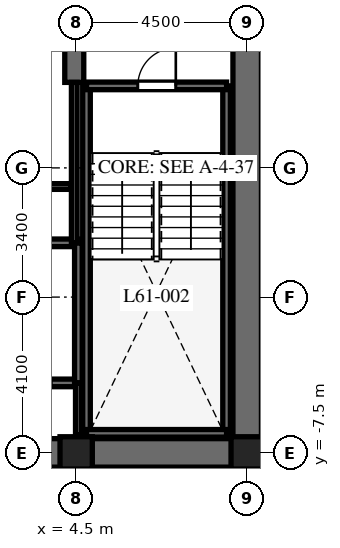
"""IFC4 building model, lengths in metres.
Left out: names, types, materials, properties, quantities, classifications, styles, units other than length and angle.
Written with IfcOpenShell. Run it as: python <this file> out.ifc"""

import sys

from ifc_helpers import new_model, si_unit, direction, frame, frame_2d, origin, origin_2d, place, context, subcontext, project, spatial, rectangle, extrude, element, fill, save


model = new_model("IFC4")
c1 = context("Model", 3, precision=1e-05, world=origin(), true_north=direction((0.0, 1.0)))
c2 = subcontext(c1, "Body", "Model", "MODEL_VIEW")
j1 = project(units=[si_unit("LENGTHUNIT", "METRE"), si_unit("PLANEANGLEUNIT", "RADIAN")], contexts=[c1])
p1 = place(None, origin())
s1 = spatial("IfcSite", under=j1, at=p1, CompositionType="ELEMENT")
p2 = place(p1, origin())
s2 = spatial("IfcBuilding", under=s1, at=p2, CompositionType="ELEMENT")
p3 = place(p2, frame((0.0, 0.0, 244.5)))
s3 = spatial("IfcBuildingStorey", under=s2, at=p3, CompositionType="ELEMENT", Elevation=244.5)
p4 = place(p3, frame((-9.375, -7.5, 0.0), z_axis=(0.0, 0.0, 1.0), x_axis=(1.0, 0.0, 0.0)))
e1 = element("IfcWall", 1, at=p4, inside=s3, PredefinedType="SHEAR", context=c2, shape_type="SweptSolid", body=[
    extrude(rectangle(XDim=18.75, YDim=0.75, at=frame_2d((9.375, 0.0))), origin(), (0.0, 0.0, 1.0), 3.8),
])
p5 = place(p4, frame((9.425, 0.0, 0.0)))
e2 = element("IfcOpeningElement", 2, at=p5, cuts=e1, PredefinedType="OPENING", context=c2, shape_type="SweptSolid", body=[
    extrude(rectangle(XDim=1.0, YDim=2.15, at=frame_2d((0.5, 1.075))), frame((0.0, 0.385, 0.0), z_axis=(0.0, -1.0, 0.0), x_axis=(1.0, 0.0, 0.0)), (0.0, 0.0, 1.0), 0.77),
])
p6 = place(p3, frame((9.0, -7.125, 0.0), z_axis=(0.0, 0.0, 1.0), x_axis=(0.0, 1.0, 0.0)))
e3 = element("IfcWall", 3, at=p6, inside=s3, PredefinedType="SHEAR", context=c2, shape_type="SweptSolid", body=[
    extrude(rectangle(XDim=14.25, YDim=0.75, at=frame_2d((7.125, 0.0))), origin(), (0.0, 0.0, 1.0), 3.8),
])
p7 = place(p6, frame((10.25, 0.0, 0.0)))
e4 = element("IfcOpeningElement", 4, at=p7, cuts=e3, PredefinedType="OPENING", context=c2, shape_type="SweptSolid", body=[
    extrude(rectangle(XDim=1.05, YDim=2.15, at=frame_2d((0.525, 1.075))), frame((0.0, 0.385, 0.0), z_axis=(0.0, -1.0, 0.0), x_axis=(1.0, 0.0, 0.0)), (0.0, 0.0, 1.0), 0.77),
])
p8 = place(p3, frame((4.45, 2.25, 0.0), z_axis=(0.0, 0.0, 1.0), x_axis=(0.0, 1.0, 0.0)))
e5 = element("IfcWall", 5, at=p8, inside=s3, PredefinedType="SHEAR", context=c2, shape_type="SweptSolid", body=[
    extrude(rectangle(XDim=4.875, YDim=0.5, at=frame_2d((2.438, 0.0))), origin(), (0.0, 0.0, 1.0), 3.8),
])
for number, where, z_axis, x_axis in (
    (6, (4.772, -6.985, 0.0), (0.0, 0.0, 1.0), (0.0, 1.0, 0.0)),
    (7, (8.458, -6.985, 0.0), (0.0, 0.0, 1.0), (0.0, 1.0, 0.0)),
):
    element("IfcWall", number, at=place(p3, frame(where, z_axis=z_axis, x_axis=x_axis)), inside=s3, PredefinedType="SHEAR", context=c2, shape_type="SweptSolid", body=[
        extrude(rectangle(XDim=9.143, YDim=0.2, at=frame_2d((4.572, 0.0))), origin(), (0.0, 0.0, 1.0), 3.8),
    ])
p9 = place(p3, frame((4.772, -6.985, 0.0), z_axis=(0.0, 0.0, 1.0), x_axis=(1.0, 0.0, 0.0)))
e8 = element("IfcWall", 8, at=p9, inside=s3, PredefinedType="SHEAR", context=c2, shape_type="SweptSolid", body=[
    extrude(rectangle(XDim=3.686, YDim=0.2, at=frame_2d((1.843, 0.0))), origin(), (0.0, 0.0, 1.0), 3.8),
])
p10 = place(p3, frame((4.772, 2.158, 0.0), z_axis=(0.0, 0.0, 1.0), x_axis=(1.0, 0.0, 0.0)))
e9 = element("IfcWall", 9, at=p10, inside=s3, PredefinedType="SHEAR", context=c2, shape_type="SweptSolid", body=[
    extrude(rectangle(XDim=3.686, YDim=0.2, at=frame_2d((1.843, 0.0))), origin(), (0.0, 0.0, 1.0), 3.8),
])
p11 = place(p10, frame((1.35, 0.0, 0.0)))
e10 = element("IfcOpeningElement", 10, at=p11, cuts=e9, PredefinedType="OPENING", context=c2, shape_type="SweptSolid", body=[
    extrude(rectangle(XDim=1.0, YDim=2.15, at=frame_2d((0.5, 1.075))), frame((0.0, 0.11, 0.0), z_axis=(0.0, -1.0, 0.0), x_axis=(1.0, 0.0, 0.0)), (0.0, 0.0, 1.0), 0.22),
])
p12 = place(p3, frame((-4.608, -5.658, 0.0), z_axis=(0.0, 0.0, 1.0), x_axis=(1.0, 0.0, 0.0)))
e11 = element("IfcWall", 11, at=p12, inside=s3, PredefinedType="SHEAR", context=c2, shape_type="SweptSolid", body=[
    extrude(rectangle(XDim=9.166, YDim=0.2, at=frame_2d((4.583, 0.0))), origin(), (0.0, 0.0, 1.0), 3.8),
])
p13 = place(p12, frame((7.45, 0.0, 0.0)))
e12 = element("IfcOpeningElement", 12, at=p13, cuts=e11, PredefinedType="OPENING", context=c2, shape_type="SweptSolid", body=[
    extrude(rectangle(XDim=1.0, YDim=2.15, at=frame_2d((0.5, 1.075))), frame((0.0, 0.11, 0.0), z_axis=(0.0, -1.0, 0.0), x_axis=(1.0, 0.0, 0.0)), (0.0, 0.0, 1.0), 0.22),
])
p14 = place(p3, frame((-4.608, -1.972, 0.0), z_axis=(0.0, 0.0, 1.0), x_axis=(1.0, 0.0, 0.0)))
e13 = element("IfcWall", 13, at=p14, inside=s3, PredefinedType="SHEAR", context=c2, shape_type="SweptSolid", body=[
    extrude(rectangle(XDim=9.166, YDim=0.2, at=frame_2d((4.583, 0.0))), origin(), (0.0, 0.0, 1.0), 3.8),
])
p15 = place(p3, frame((4.558, -5.658, 0.0), z_axis=(0.0, 0.0, 1.0), x_axis=(0.0, 1.0, 0.0)))
e14 = element("IfcWall", 14, at=p15, inside=s3, PredefinedType="SHEAR", context=c2, shape_type="SweptSolid", body=[
    extrude(rectangle(XDim=3.686, YDim=0.2, at=frame_2d((1.843, 0.0))), origin(), (0.0, 0.0, 1.0), 3.8),
])
for number, where, z_axis, x_axis in (
    (15, (4.5, -7.5, 0.0), (0.0, 0.0, 1.0), (1.0, 0.0, 0.0)),
    (16, (9.0, -7.5, 0.0), (0.0, 0.0, 1.0), (1.0, 0.0, 0.0)),
):
    element("IfcColumn", number, at=place(p3, frame(where, z_axis=z_axis, x_axis=x_axis)), inside=s3, PredefinedType="COLUMN", context=c2, shape_type="SweptSolid", body=[
        extrude(rectangle(XDim=0.85, YDim=0.85, at=origin_2d()), origin(), (0.0, 0.0, 1.0), 3.8),
    ])
p16 = place(p3, frame((4.558, -7.02, 0.0), z_axis=(0.0, 0.0, 1.0), x_axis=(0.0, 1.0, 0.0)))
e17 = element("IfcWall", 17, at=p16, inside=s3, PredefinedType="PARTITIONING", context=c2, shape_type="SweptSolid", body=[
    extrude(rectangle(XDim=1.362, YDim=0.15, at=frame_2d((0.681, 0.0))), origin(), (0.0, 0.0, 1.0), 3.5),
])
p17 = place(p3, frame((4.45, -1.972, 0.0), z_axis=(0.0, 0.0, 1.0), x_axis=(0.0, 1.0, 0.0)))
e18 = element("IfcWall", 18, at=p17, inside=s3, PredefinedType="PARTITIONING", context=c2, shape_type="SweptSolid", body=[
    extrude(rectangle(XDim=4.222, YDim=0.15, at=frame_2d((2.111, 0.0))), origin(), (0.0, 0.0, 1.0), 3.5),
])
p18 = place(p3, frame((-4.36, -0.49, 0.0), z_axis=(0.0, 0.0, 1.0), x_axis=(1.0, 0.0, 0.0)))
e19 = element("IfcWall", 19, at=p18, inside=s3, PredefinedType="PARTITIONING", context=c2, shape_type="SweptSolid", body=[
    extrude(rectangle(XDim=8.72, YDim=0.15, at=frame_2d((4.36, 0.0))), origin(), (0.0, 0.0, 1.0), 3.5),
])
p19 = place(p18, frame((3.16, 0.0, 0.0)))
e20 = element("IfcOpeningElement", 20, at=p19, cuts=e19, PredefinedType="OPENING", context=c2, shape_type="SweptSolid", body=[
    extrude(rectangle(XDim=0.85, YDim=2.03, at=frame_2d((0.425, 1.015))), frame((0.0, 0.085, 0.0), z_axis=(0.0, -1.0, 0.0), x_axis=(1.0, 0.0, 0.0)), (0.0, 0.0, 1.0), 0.17),
])
p20 = place(p18, frame((5.21, 0.0, 0.0)))
e21 = element("IfcOpeningElement", 21, at=p20, cuts=e19, PredefinedType="OPENING", context=c2, shape_type="SweptSolid", body=[
    extrude(rectangle(XDim=0.85, YDim=2.03, at=frame_2d((0.425, 1.015))), frame((0.0, 0.085, 0.0), z_axis=(0.0, -1.0, 0.0), x_axis=(1.0, 0.0, 0.0)), (0.0, 0.0, 1.0), 0.17),
])
p21 = place(p11, origin())
e22 = element("IfcDoor", 22, at=p21, inside=s3, OperationType="SINGLE_SWING_RIGHT", PredefinedType="DOOR", context=c2, shape_type="SweptSolid", body=[
    extrude(rectangle(XDim=1.0, YDim=2.15, at=frame_2d((0.5, 1.075))), frame((0.0, 0.025, 0.0), z_axis=(0.0, -1.0, 0.0), x_axis=(1.0, 0.0, 0.0)), (0.0, 0.0, 1.0), 0.05),
])
fill(e10, e22)
save(model, sys.argv[1])
